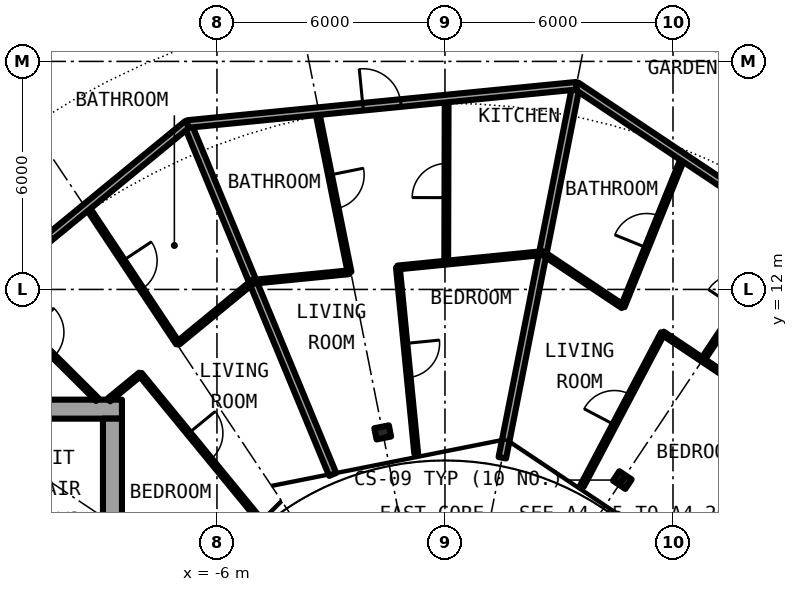
"""IFC4 building model, lengths in metres.
Left out: names, types, materials, properties, quantities, classifications, styles, units other than length and angle.
Written with IfcOpenShell. Run it as: python <this file> out.ifc"""

import sys

from ifc_helpers import new_model, si_unit, direction, frame, frame_2d, origin, origin_2d, place, context, subcontext, project, spatial, rectangle, i_section, extrude, element, fill, save


model = new_model("IFC4")
c1 = context("Model", 3, precision=1e-05, world=origin(), true_north=direction((0.0, 1.0)))
c2 = subcontext(c1, "Body", "Model", "MODEL_VIEW")
j1 = project(units=[si_unit("LENGTHUNIT", "METRE"), si_unit("PLANEANGLEUNIT", "RADIAN")], contexts=[c1])
p1 = place(None, origin())
s1 = spatial("IfcSite", under=j1, at=p1, CompositionType="ELEMENT")
p2 = place(p1, origin())
s2 = spatial("IfcBuilding", under=s1, at=p2, CompositionType="ELEMENT")
p3 = place(p2, frame((0.0, 0.0, 145.2)))
s3 = spatial("IfcBuildingStorey", under=s2, at=p3, CompositionType="ELEMENT", Elevation=145.2)
for number, where, z_axis, x_axis in (
    (1, (4.667, 6.984, 0.0), (0.0, 0.0, 1.0), (0.556, 0.831, 0.0)),
    (2, (-1.639, 8.239, 0.0), (0.0, 0.0, 1.0), (-0.195, 0.981, 0.0)),
):
    element("IfcColumn", number, at=place(p3, frame(where, z_axis=z_axis, x_axis=x_axis)), inside=s3, PredefinedType="COLUMN", context=c2, shape_type="SweptSolid", body=[
        extrude(i_section(OverallWidth=0.3, OverallDepth=0.39, WebThickness=0.011, FlangeThickness=0.019, FilletRadius=0.027, at=origin_2d()), origin(), (0.0, 0.0, 1.0), 3.05),
    ])
p4 = place(p3, frame((-8.5, 8.85, 0.0), z_axis=(0.0, 0.0, 1.0), x_axis=(-1.0, 0.0, 0.0)))
e3 = element("IfcWall", 3, at=p4, inside=s3, PredefinedType="SHEAR", context=c2, shape_type="SweptSolid", body=[
    extrude(rectangle(XDim=13.6, YDim=0.5, at=frame_2d((6.8, 0.0))), origin(), (0.0, 0.0, 1.0), 3.05),
])
p5 = place(p4, frame((11.375, 0.0, 0.0)))
e4 = element("IfcOpeningElement", 4, at=p5, cuts=e3, PredefinedType="OPENING", context=c2, shape_type="SweptSolid", body=[
    extrude(rectangle(XDim=1.2, YDim=2.3, at=frame_2d((0.6, 1.15))), frame((0.0, 0.26, 0.0), z_axis=(0.0, -1.0, 0.0), x_axis=(1.0, 0.0, 0.0)), (0.0, 0.0, 1.0), 0.52),
])
p6 = place(p3, frame((-8.75, 8.6, 0.0), z_axis=(0.0, 0.0, 1.0), x_axis=(0.0, -1.0, 0.0)))
e5 = element("IfcWall", 5, at=p6, inside=s3, PredefinedType="SHEAR", context=c2, shape_type="SweptSolid", body=[
    extrude(rectangle(XDim=17.2, YDim=0.5, at=frame_2d((8.6, 0.0))), origin(), (0.0, 0.0, 1.0), 3.05),
])
p7 = place(p6, frame((7.4, 0.0, 0.1)))
e6 = element("IfcOpeningElement", 6, at=p7, cuts=e5, PredefinedType="OPENING", context=c2, shape_type="SweptSolid", body=[
    extrude(rectangle(XDim=2.4, YDim=2.2, at=frame_2d((1.2, 1.1))), frame((0.0, 0.26, 0.0), z_axis=(0.0, -1.0, 0.0), x_axis=(1.0, 0.0, 0.0)), (0.0, 0.0, 1.0), 0.52),
])
p8 = place(p3, frame((1.509, 7.571, 0.0), z_axis=(0.0, 0.0, 1.0), x_axis=(0.194375258943, 0.980927244351, 0.0)))
e7 = element("IfcWall", 7, at=p8, inside=s3, PredefinedType="PARTITIONING", context=c2, shape_type="SweptSolid", body=[
    extrude(rectangle(XDim=9.98, YDim=0.2, at=frame_2d((4.99, 0.0))), origin(), (0.0, 0.0, 1.0), 2.7),
])
p9 = place(p3, frame((-12.069, 12.007, 0.0), z_axis=(0.0, 0.0, 1.0), x_axis=(0.708822693149, -0.705386695138, 0.0)))
e8 = element("IfcWall", 8, at=p9, inside=s3, PredefinedType="PARTITIONING", context=c2, shape_type="SweptSolid", body=[
    extrude(rectangle(XDim=4.121, YDim=0.1, at=frame_2d((2.061, 0.0))), origin(), (0.0, 0.0, 1.0), 2.7),
])
p10 = place(p9, frame((1.611, 0.0, 0.0)))
e9 = element("IfcOpeningElement", 9, at=p10, cuts=e8, PredefinedType="OPENING", context=c2, shape_type="SweptSolid", body=[
    extrude(rectangle(XDim=0.9, YDim=2.3, at=frame_2d((0.45, 1.15))), frame((0.0, 0.06, 0.0), z_axis=(0.0, -1.0, 0.0), x_axis=(1.0, 0.0, 0.0)), (0.0, 0.0, 1.0), 0.12),
])
p11 = place(p3, frame((-9.421, 14.18, 0.0), z_axis=(0.0, 0.0, 1.0), x_axis=(0.553303732327, -0.832979579457, 0.0)))
e10 = element("IfcWall", 10, at=p11, inside=s3, PredefinedType="PARTITIONING", context=c2, shape_type="SweptSolid", body=[
    extrude(rectangle(XDim=4.319, YDim=0.1, at=frame_2d((2.16, 0.0))), origin(), (0.0, 0.0, 1.0), 2.7),
])
p12 = place(p11, frame((1.71, 0.0, 0.0)))
e11 = element("IfcOpeningElement", 11, at=p12, cuts=e10, PredefinedType="OPENING", context=c2, shape_type="SweptSolid", body=[
    extrude(rectangle(XDim=0.9, YDim=2.3, at=frame_2d((0.45, 1.15))), frame((0.0, 0.06, 0.0), z_axis=(0.0, -1.0, 0.0), x_axis=(1.0, 0.0, 0.0)), (0.0, 0.0, 1.0), 0.12),
])
p13 = place(p3, frame((-8.019, 9.771, 0.0), z_axis=(0.0, 0.0, 1.0), x_axis=(0.634401778971, -0.773003481776, 0.0)))
e12 = element("IfcWall", 12, at=p13, inside=s3, PredefinedType="PARTITIONING", context=c2, shape_type="SweptSolid", body=[
    extrude(rectangle(XDim=4.92, YDim=0.1, at=frame_2d((2.46, 0.0))), origin(), (0.0, 0.0, 1.0), 2.7),
])
p14 = place(p13, frame((2.01, 0.0, 0.0)))
e13 = element("IfcOpeningElement", 13, at=p14, cuts=e12, PredefinedType="OPENING", context=c2, shape_type="SweptSolid", body=[
    extrude(rectangle(XDim=0.9, YDim=2.3, at=frame_2d((0.45, 1.15))), frame((0.0, 0.06, 0.0), z_axis=(0.0, -1.0, 0.0), x_axis=(1.0, 0.0, 0.0)), (0.0, 0.0, 1.0), 0.12),
])
p15 = place(p3, frame((-6.775, 16.352, 0.0), z_axis=(0.0, 0.0, 1.0), x_axis=(0.382750767534, -0.923851638496, 0.0)))
e14 = element("IfcWall", 14, at=p15, inside=s3, PredefinedType="PARTITIONING", context=c2, shape_type="SweptSolid", body=[
    extrude(rectangle(XDim=9.98, YDim=0.2, at=frame_2d((4.99, 0.0))), origin(), (0.0, 0.0, 1.0), 2.7),
])
p16 = place(p3, frame((-3.365, 16.688, 0.0), z_axis=(0.0, 0.0, 1.0), x_axis=(0.197724661373, -0.980257597923, 0.0)))
e15 = element("IfcWall", 15, at=p16, inside=s3, PredefinedType="PARTITIONING", context=c2, shape_type="SweptSolid", body=[
    extrude(rectangle(XDim=4.319, YDim=0.1, at=frame_2d((2.16, 0.0))), origin(), (0.0, 0.0, 1.0), 2.7),
])
p17 = place(p16, frame((1.71, 0.0, 0.0)))
e16 = element("IfcOpeningElement", 16, at=p17, cuts=e15, PredefinedType="OPENING", context=c2, shape_type="SweptSolid", body=[
    extrude(rectangle(XDim=0.9, YDim=2.3, at=frame_2d((0.45, 1.15))), frame((0.0, 0.06, 0.0), z_axis=(0.0, -1.0, 0.0), x_axis=(1.0, 0.0, 0.0)), (0.0, 0.0, 1.0), 0.12),
])
p18 = place(p3, frame((-1.239, 12.579, 0.0), z_axis=(0.0, 0.0, 1.0), x_axis=(0.097960786067, -0.995190275472, 0.0)))
e17 = element("IfcWall", 17, at=p18, inside=s3, PredefinedType="PARTITIONING", context=c2, shape_type="SweptSolid", body=[
    extrude(rectangle(XDim=4.92, YDim=0.1, at=frame_2d((2.46, 0.0))), origin(), (0.0, 0.0, 1.0), 2.7),
])
p19 = place(p18, frame((2.01, 0.0, 0.0)))
e18 = element("IfcOpeningElement", 18, at=p19, cuts=e17, PredefinedType="OPENING", context=c2, shape_type="SweptSolid", body=[
    extrude(rectangle(XDim=0.9, YDim=2.3, at=frame_2d((0.45, 1.15))), frame((0.0, 0.06, 0.0), z_axis=(0.0, -1.0, 0.0), x_axis=(1.0, 0.0, 0.0)), (0.0, 0.0, 1.0), 0.12),
])
p20 = place(p3, frame((0.033, 12.705, 0.0), z_axis=(0.0, 0.0, 1.0), x_axis=(0.002543801832, 0.999996764531, 0.0)))
e19 = element("IfcWall", 19, at=p20, inside=s3, PredefinedType="PARTITIONING", context=c2, shape_type="SweptSolid", body=[
    extrude(rectangle(XDim=4.319, YDim=0.1, at=frame_2d((2.159, 0.0))), origin(), (0.0, 0.0, 1.0), 2.7),
])
p21 = place(p20, frame((1.71, 0.0, 0.0)))
e20 = element("IfcOpeningElement", 20, at=p21, cuts=e19, PredefinedType="OPENING", context=c2, shape_type="SweptSolid", body=[
    extrude(rectangle(XDim=0.9, YDim=2.3, at=frame_2d((0.45, 1.15))), frame((0.0, 0.06, 0.0), z_axis=(0.0, -1.0, 0.0), x_axis=(1.0, 0.0, 0.0)), (0.0, 0.0, 1.0), 0.12),
])
p22 = place(p3, frame((3.605, 6.827, 0.0), z_axis=(0.0, 0.0, 1.0), x_axis=(0.466962677975, 0.884277025246, 0.0)))
e21 = element("IfcWall", 21, at=p22, inside=s3, PredefinedType="PARTITIONING", context=c2, shape_type="SweptSolid", body=[
    extrude(rectangle(XDim=4.549, YDim=0.1, at=frame_2d((2.274, 0.0))), origin(), (0.0, 0.0, 1.0), 2.7),
])
p23 = place(p22, frame((1.824, 0.0, 0.0)))
e22 = element("IfcOpeningElement", 22, at=p23, cuts=e21, PredefinedType="OPENING", context=c2, shape_type="SweptSolid", body=[
    extrude(rectangle(XDim=0.9, YDim=2.3, at=frame_2d((0.45, 1.15))), frame((0.0, 0.06, 0.0), z_axis=(0.0, -1.0, 0.0), x_axis=(1.0, 0.0, 0.0)), (0.0, 0.0, 1.0), 0.12),
])
p24 = place(p3, frame((4.678, 11.551, 0.0), z_axis=(0.0, 0.0, 1.0), x_axis=(0.375509828455, 0.926818411952, 0.0)))
e23 = element("IfcWall", 23, at=p24, inside=s3, PredefinedType="PARTITIONING", context=c2, shape_type="SweptSolid", body=[
    extrude(rectangle(XDim=4.237, YDim=0.1, at=frame_2d((2.119, 0.0))), origin(), (0.0, 0.0, 1.0), 2.7),
])
p25 = place(p24, frame((1.669, 0.0, 0.0)))
e24 = element("IfcOpeningElement", 24, at=p25, cuts=e23, PredefinedType="OPENING", context=c2, shape_type="SweptSolid", body=[
    extrude(rectangle(XDim=0.9, YDim=2.3, at=frame_2d((0.45, 1.15))), frame((0.0, 0.06, 0.0), z_axis=(0.0, -1.0, 0.0), x_axis=(1.0, 0.0, 0.0)), (0.0, 0.0, 1.0), 0.12),
])
p26 = place(p3, frame((6.78, 10.147, 0.0), z_axis=(0.0, 0.0, 1.0), x_axis=(0.555528237031, 0.831497671591, 0.0)))
e25 = element("IfcWall", 25, at=p26, inside=s3, PredefinedType="PARTITIONING", context=c2, shape_type="SweptSolid", body=[
    extrude(rectangle(XDim=4.149, YDim=0.1, at=frame_2d((2.075, 0.0))), origin(), (0.0, 0.0, 1.0), 2.7),
])
p27 = place(p26, frame((1.625, 0.0, 0.0)))
e26 = element("IfcOpeningElement", 26, at=p27, cuts=e25, PredefinedType="OPENING", context=c2, shape_type="SweptSolid", body=[
    extrude(rectangle(XDim=0.9, YDim=2.3, at=frame_2d((0.45, 1.15))), frame((0.0, 0.06, 0.0), z_axis=(0.0, -1.0, 0.0), x_axis=(1.0, 0.0, 0.0)), (0.0, 0.0, 1.0), 0.12),
])
p28 = place(p3, frame((2.577, 12.955, 0.0), z_axis=(0.0, 0.0, 1.0), x_axis=(0.831440395268, -0.555613956912, 0.0)))
e27 = element("IfcWall", 27, at=p28, inside=s3, PredefinedType="PARTITIONING", context=c2, shape_type="SweptSolid", body=[
    extrude(rectangle(XDim=2.527, YDim=0.1, at=frame_2d((1.264, 0.0))), origin(), (0.0, 0.0, 1.0), 2.7),
])
p29 = place(p3, frame((5.731, 10.848, 0.0), z_axis=(0.0, 0.0, 1.0), x_axis=(0.831339441646, -0.555764997786, 0.0)))
e28 = element("IfcWall", 28, at=p29, inside=s3, PredefinedType="PARTITIONING", context=c2, shape_type="SweptSolid", body=[
    extrude(rectangle(XDim=3.332, YDim=0.1, at=frame_2d((1.666, 0.0))), origin(), (0.0, 0.0, 1.0), 2.7),
])
p30 = place(p3, frame((-8.842, 9.095, 0.0), z_axis=(0.0, 0.0, 1.0), x_axis=(0.772730269942, 0.634734534995, 0.0)))
e29 = element("IfcWall", 29, at=p30, inside=s3, PredefinedType="PARTITIONING", context=c2, shape_type="SweptSolid", body=[
    extrude(rectangle(XDim=1.065, YDim=0.1, at=frame_2d((0.532, 0.0))), origin(), (0.0, 0.0, 1.0), 2.7),
])
p31 = place(p3, frame((-7.034, 10.58, 0.0), z_axis=(0.0, 0.0, 1.0), x_axis=(0.772764723682, 0.634692588449, 0.0)))
e30 = element("IfcWall", 30, at=p31, inside=s3, PredefinedType="PARTITIONING", context=c2, shape_type="SweptSolid", body=[
    extrude(rectangle(XDim=2.557, YDim=0.1, at=frame_2d((1.278, 0.0))), origin(), (0.0, 0.0, 1.0), 2.7),
])
p32 = place(p3, frame((-5.065, 12.2, 0.0), z_axis=(0.0, 0.0, 1.0), x_axis=(0.995131297413, 0.098558109302, 0.0)))
e31 = element("IfcWall", 31, at=p32, inside=s3, PredefinedType="PARTITIONING", context=c2, shape_type="SweptSolid", body=[
    extrude(rectangle(XDim=2.556, YDim=0.1, at=frame_2d((1.278, 0.0))), origin(), (0.0, 0.0, 1.0), 2.7),
])
p33 = place(p3, frame((-1.246, 12.578, 0.0), z_axis=(0.0, 0.0, 1.0), x_axis=(0.995125670186, 0.098614910314, 0.0)))
e32 = element("IfcWall", 32, at=p33, inside=s3, PredefinedType="PARTITIONING", context=c2, shape_type="SweptSolid", body=[
    extrude(rectangle(XDim=3.835, YDim=0.1, at=frame_2d((1.917, 0.0))), origin(), (0.0, 0.0, 1.0), 2.7),
])
p34 = place(p3, frame((3.453, 17.36, 0.0), z_axis=(0.0, 0.0, 1.0), x_axis=(0.831437137577, -0.555618831806, 0.0)))
e33 = element("IfcWall", 33, at=p34, inside=s3, PredefinedType="PARTITIONING", context=c2, shape_type="SweptSolid", body=[
    extrude(rectangle(XDim=13.549, YDim=0.2, at=frame_2d((6.774, 0.0))), origin(), (0.0, 0.0, 1.0), 2.7),
])
p35 = place(p34, frame((4.581, 0.0, 0.0)))
e34 = element("IfcOpeningElement", 34, at=p35, cuts=e33, PredefinedType="OPENING", context=c2, shape_type="SweptSolid", body=[
    extrude(rectangle(XDim=1.0, YDim=2.3, at=frame_2d((0.5, 1.15))), frame((0.0, 0.11, 0.0), z_axis=(0.0, -1.0, 0.0), x_axis=(1.0, 0.0, 0.0)), (0.0, 0.0, 1.0), 0.22),
])
p36 = place(p3, frame((-14.717, 9.834, 0.0), z_axis=(0.0, 0.0, 1.0), x_axis=(0.773034536097, 0.634363938131, 0.0)))
e35 = element("IfcWall", 35, at=p36, inside=s3, PredefinedType="PARTITIONING", context=c2, shape_type="SweptSolid", body=[
    extrude(rectangle(XDim=10.277, YDim=0.2, at=frame_2d((5.138, 0.0))), origin(), (0.0, 0.0, 1.0), 2.7),
])
p37 = place(p36, frame((4.638, 0.0, 0.0)))
e36 = element("IfcOpeningElement", 36, at=p37, cuts=e35, PredefinedType="OPENING", context=c2, shape_type="SweptSolid", body=[
    extrude(rectangle(XDim=1.0, YDim=2.3, at=frame_2d((0.5, 1.15))), frame((0.0, 0.11, 0.0), z_axis=(0.0, -1.0, 0.0), x_axis=(1.0, 0.0, 0.0)), (0.0, 0.0, 1.0), 0.22),
])
p38 = place(p3, frame((-6.773, 16.353, 0.0), z_axis=(0.0, 0.0, 1.0), x_axis=(0.995201809366, 0.097843541607, 0.0)))
e37 = element("IfcWall", 37, at=p38, inside=s3, PredefinedType="PARTITIONING", context=c2, shape_type="SweptSolid", body=[
    extrude(rectangle(XDim=10.28, YDim=0.2, at=frame_2d((5.14, 0.0))), origin(), (0.0, 0.0, 1.0), 2.7),
])
p39 = place(p38, frame((4.638, 0.0, 0.0)))
e38 = element("IfcOpeningElement", 38, at=p39, cuts=e37, PredefinedType="OPENING", context=c2, shape_type="SweptSolid", body=[
    extrude(rectangle(XDim=1.0, YDim=2.3, at=frame_2d((0.5, 1.15))), frame((0.0, 0.11, 0.0), z_axis=(0.0, -1.0, 0.0), x_axis=(1.0, 0.0, 0.0)), (0.0, 0.0, 1.0), 0.22),
])
p40 = place(p3, frame((-14.15, 17.235, 0.0), z_axis=(0.0, 0.0, 1.0), x_axis=(0.857604752351, 0.514309331769, 0.0)))
e39 = element("IfcWall", 39, at=p40, inside=s3, PredefinedType="PARTITIONING", context=c2, shape_type="SweptSolid", body=[
    extrude(rectangle(XDim=6.548, YDim=0.2, at=frame_2d((3.274, 0.0))), origin(), (0.0, 0.0, 1.0), 2.7),
])
p41 = place(p40, frame((1.685, 0.0, 0.0)))
e40 = element("IfcOpeningElement", 40, at=p41, cuts=e39, PredefinedType="OPENING", context=c2, shape_type="SweptSolid", body=[
    extrude(rectangle(XDim=1.0, YDim=2.3, at=frame_2d((0.5, 1.15))), frame((0.0, 0.11, 0.0), z_axis=(0.0, -1.0, 0.0), x_axis=(1.0, 0.0, 0.0)), (0.0, 0.0, 1.0), 0.22),
])
p42 = place(p25, origin())
e41 = element("IfcDoor", 41, at=p42, inside=s3, OperationType="SINGLE_SWING_RIGHT", PredefinedType="DOOR", context=c2, shape_type="SweptSolid", body=[
    extrude(rectangle(XDim=0.9, YDim=2.3, at=frame_2d((0.45, 1.15))), frame((0.0, 0.025, 0.0), z_axis=(0.0, -1.0, 0.0), x_axis=(1.0, 0.0, 0.0)), (0.0, 0.0, 1.0), 0.05),
])
fill(e24, e41)
p43 = place(p23, origin())
e42 = element("IfcDoor", 42, at=p43, inside=s3, OperationType="SINGLE_SWING_LEFT", PredefinedType="DOOR", context=c2, shape_type="SweptSolid", body=[
    extrude(rectangle(XDim=0.9, YDim=2.3, at=frame_2d((0.45, 1.15))), frame((0.0, 0.025, 0.0), z_axis=(0.0, -1.0, 0.0), x_axis=(1.0, 0.0, 0.0)), (0.0, 0.0, 1.0), 0.05),
])
fill(e22, e42)
p44 = place(p39, origin())
e43 = element("IfcDoor", 43, at=p44, inside=s3, OperationType="SINGLE_SWING_LEFT", PredefinedType="DOOR", context=c2, shape_type="SweptSolid", body=[
    extrude(rectangle(XDim=1.0, YDim=2.3, at=frame_2d((0.5, 1.15))), frame((0.0, 0.025, 0.0), z_axis=(0.0, -1.0, 0.0), x_axis=(1.0, 0.0, 0.0)), (0.0, 0.0, 1.0), 0.05),
])
fill(e38, e43)
p45 = place(p17, origin())
e44 = element("IfcDoor", 44, at=p45, inside=s3, OperationType="SINGLE_SWING_RIGHT", PredefinedType="DOOR", context=c2, shape_type="SweptSolid", body=[
    extrude(rectangle(XDim=0.9, YDim=2.3, at=frame_2d((0.45, 1.15))), frame((0.0, 0.025, 0.0), z_axis=(0.0, -1.0, 0.0), x_axis=(1.0, 0.0, 0.0)), (0.0, 0.0, 1.0), 0.05),
])
fill(e16, e44)
p46 = place(p21, origin())
e45 = element("IfcDoor", 45, at=p46, inside=s3, OperationType="SINGLE_SWING_RIGHT", PredefinedType="DOOR", context=c2, shape_type="SweptSolid", body=[
    extrude(rectangle(XDim=0.9, YDim=2.3, at=frame_2d((0.45, 1.15))), frame((0.0, 0.025, 0.0), z_axis=(0.0, -1.0, 0.0), x_axis=(1.0, 0.0, 0.0)), (0.0, 0.0, 1.0), 0.05),
])
fill(e20, e45)
p47 = place(p19, origin())
e46 = element("IfcDoor", 46, at=p47, inside=s3, OperationType="SINGLE_SWING_LEFT", PredefinedType="DOOR", context=c2, shape_type="SweptSolid", body=[
    extrude(rectangle(XDim=0.9, YDim=2.3, at=frame_2d((0.45, 1.15))), frame((0.0, 0.025, 0.0), z_axis=(0.0, -1.0, 0.0), x_axis=(1.0, 0.0, 0.0)), (0.0, 0.0, 1.0), 0.05),
])
fill(e18, e46)
p48 = place(p12, origin())
e47 = element("IfcDoor", 47, at=p48, inside=s3, OperationType="SINGLE_SWING_RIGHT", PredefinedType="DOOR", context=c2, shape_type="SweptSolid", body=[
    extrude(rectangle(XDim=0.9, YDim=2.3, at=frame_2d((0.45, 1.15))), frame((0.0, 0.025, 0.0), z_axis=(0.0, -1.0, 0.0), x_axis=(1.0, 0.0, 0.0)), (0.0, 0.0, 1.0), 0.05),
])
fill(e11, e47)
p49 = place(p10, origin())
e48 = element("IfcDoor", 48, at=p49, inside=s3, OperationType="SINGLE_SWING_RIGHT", PredefinedType="DOOR", context=c2, shape_type="SweptSolid", body=[
    extrude(rectangle(XDim=0.9, YDim=2.3, at=frame_2d((0.45, 1.15))), frame((0.0, 0.025, 0.0), z_axis=(0.0, -1.0, 0.0), x_axis=(1.0, 0.0, 0.0)), (0.0, 0.0, 1.0), 0.05),
])
fill(e9, e48)
p50 = place(p14, origin())
e49 = element("IfcDoor", 49, at=p50, inside=s3, OperationType="SINGLE_SWING_RIGHT", PredefinedType="DOOR", context=c2, shape_type="SweptSolid", body=[
    extrude(rectangle(XDim=0.9, YDim=2.3, at=frame_2d((0.45, 1.15))), frame((0.0, 0.025, 0.0), z_axis=(0.0, -1.0, 0.0), x_axis=(1.0, 0.0, 0.0)), (0.0, 0.0, 1.0), 0.05),
])
fill(e13, e49)
save(model, sys.argv[1])
